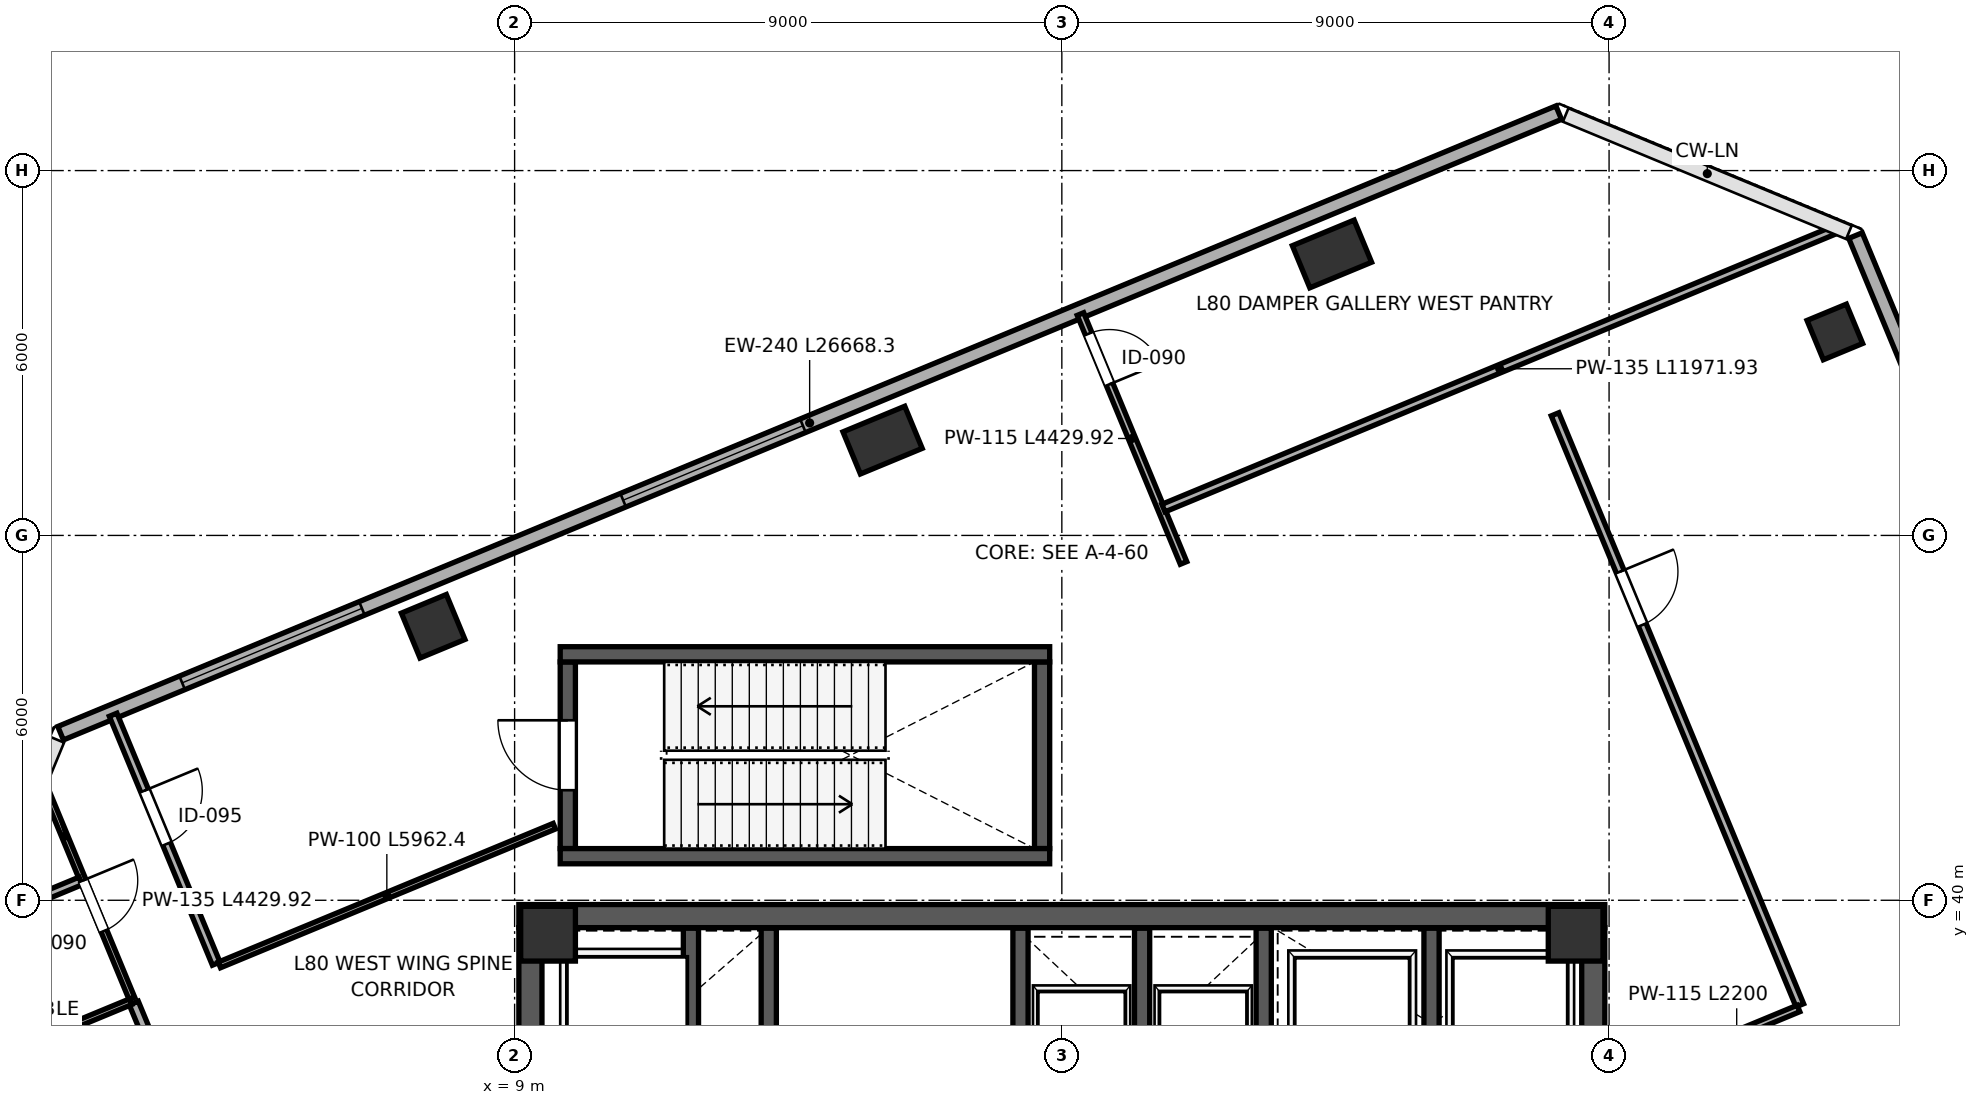
"""IFC4 building model, lengths in metres.
Left out: names, types, materials, properties, quantities, classifications, styles, units other than length and angle.
Written with IfcOpenShell. Run it as: python <this file> out.ifc"""

import sys

from ifc_helpers import new_model, si_unit, direction, frame, frame_2d, origin, origin_2d, place, context, subcontext, project, spatial, rectangle, extrude, source, transform, mapped, element, fill, save


model = new_model("IFC4")
c1 = context("Model", 3, precision=1e-05, world=origin(), true_north=direction((0.0, 1.0)))
c2 = subcontext(c1, "Body", "Model", "MODEL_VIEW")
j1 = project(units=[si_unit("LENGTHUNIT", "METRE"), si_unit("PLANEANGLEUNIT", "RADIAN")], contexts=[c1])
p1 = place(None, origin())
s1 = spatial("IfcSite", under=j1, at=p1, CompositionType="ELEMENT")
p2 = place(p1, origin())
s2 = spatial("IfcBuilding", under=s1, at=p2, CompositionType="ELEMENT")
p3 = place(p2, frame((0.0, 0.0, 355.2)))
s3 = spatial("IfcBuildingStorey", under=s2, at=p3, CompositionType="ELEMENT", Elevation=355.2)
m1 = source(origin(), c2, "Body", "SweptSolid", [
    extrude(rectangle(XDim=0.9, YDim=0.9, at=origin_2d()), origin(), (0.0, 0.0, 1.0), 4.799),
])
for number, where, z_axis, x_axis in (
    (1, (9.55, 39.45, 0.001), (0.0, 0.0, 1.0), (1.0, 0.0, 0.0)),
    (2, (26.45, 39.45, 0.001), (0.0, 0.0, 1.0), (1.0, 0.0, 0.0)),
):
    element("IfcColumn", number, at=place(p3, frame(where, z_axis=z_axis, x_axis=x_axis)), inside=s3, PredefinedType="COLUMN", context=c2, shape_type="MappedRepresentation", body=[
        mapped(m1, transform((0.0, 0.0, 0.0), scale=1.0)),
    ])
m2 = source(origin(), c2, "Body", "SweptSolid", [
    extrude(rectangle(XDim=0.7, YDim=0.7, at=origin_2d()), origin(), (0.0, 0.0, 1.0), 4.799),
])
p4 = place(p3, frame((30.713, 49.346, 0.001), z_axis=(0.0, 0.0, 1.0), x_axis=(-0.382683432365, 0.923879532511, 0.0)))
e3 = element("IfcColumn", 3, at=p4, inside=s3, PredefinedType="COLUMN", context=c2, shape_type="MappedRepresentation", body=[
    mapped(m2, transform((0.0, 0.0, 0.0), scale=1.0)),
])
m3 = source(origin(), c2, "Body", "SweptSolid", [
    extrude(rectangle(XDim=0.8, YDim=0.8, at=origin_2d()), origin(), (0.0, 0.0, 1.0), 4.799),
])
p5 = place(p3, frame((7.661, 44.506, 0.001), z_axis=(0.0, 0.0, 1.0), x_axis=(-0.382683432365, 0.923879532511, 0.0)))
e4 = element("IfcColumn", 4, at=p5, inside=s3, PredefinedType="COLUMN", context=c2, shape_type="MappedRepresentation", body=[
    mapped(m3, transform((0.0, 0.0, 0.0), scale=1.0)),
])
m4 = source(origin(), c2, "Body", "SweptSolid", [
    extrude(rectangle(XDim=0.75, YDim=1.1, at=origin_2d()), origin(), (0.0, 0.0, 1.0), 4.799),
])
for number, where, z_axis, x_axis in (
    (5, (15.052, 47.567, 0.001), (0.0, 0.0, 1.0), (-0.383, 0.924, 0.0)),
    (6, (22.443, 50.629, 0.001), (0.0, 0.0, 1.0), (-0.383, 0.924, 0.0)),
):
    element("IfcColumn", number, at=place(p3, frame(where, z_axis=z_axis, x_axis=x_axis)), inside=s3, PredefinedType="PILASTER", context=c2, shape_type="MappedRepresentation", body=[
        mapped(m4, transform((0.0, 0.0, 0.0), scale=1.0)),
    ])
p6 = place(p3, frame((40.761, 27.494, 0.0), z_axis=(0.0, 0.0, 1.0), x_axis=(-0.382690925775, 0.923876428604, 0.0)))
e7 = element("IfcWall", 7, at=p6, inside=s3, PredefinedType="SOLIDWALL", context=c2, shape_type="SweptSolid", body=[
    extrude(rectangle(XDim=25.368, YDim=0.24, at=frame_2d((12.684, 0.0))), origin(), (0.0, 0.0, 1.0), 4.52),
])
p7 = place(p6, frame((1.594, 0.0, 0.45)))
e8 = element("IfcOpeningElement", 8, at=p7, cuts=e7, PredefinedType="OPENING", context=c2, shape_type="SweptSolid", body=[
    extrude(rectangle(XDim=3.2, YDim=2.5, at=frame_2d((1.6, 1.25))), frame((0.0, 0.13, 0.0), z_axis=(0.0, -1.0, 0.0), x_axis=(1.0, 0.0, 0.0)), (0.0, 0.0, 1.0), 0.26),
])
p8 = place(p6, frame((5.144, 0.0, 0.45)))
e9 = element("IfcOpeningElement", 9, at=p8, cuts=e7, PredefinedType="OPENING", context=c2, shape_type="SweptSolid", body=[
    extrude(rectangle(XDim=3.2, YDim=2.5, at=frame_2d((1.6, 1.25))), frame((0.0, 0.13, 0.0), z_axis=(0.0, -1.0, 0.0), x_axis=(1.0, 0.0, 0.0)), (0.0, 0.0, 1.0), 0.26),
])
p9 = place(p6, frame((8.694, 0.0, 0.45)))
e10 = element("IfcOpeningElement", 10, at=p9, cuts=e7, PredefinedType="OPENING", context=c2, shape_type="SweptSolid", body=[
    extrude(rectangle(XDim=3.2, YDim=2.5, at=frame_2d((1.6, 1.25))), frame((0.0, 0.13, 0.0), z_axis=(0.0, -1.0, 0.0), x_axis=(1.0, 0.0, 0.0)), (0.0, 0.0, 1.0), 0.26),
])
p10 = place(p6, frame((12.244, 0.0, 0.45)))
e11 = element("IfcOpeningElement", 11, at=p10, cuts=e7, PredefinedType="OPENING", context=c2, shape_type="SweptSolid", body=[
    extrude(rectangle(XDim=3.2, YDim=2.5, at=frame_2d((1.6, 1.25))), frame((0.0, 0.13, 0.0), z_axis=(0.0, -1.0, 0.0), x_axis=(1.0, 0.0, 0.0)), (0.0, 0.0, 1.0), 0.26),
])
p11 = place(p6, frame((15.794, 0.0, 0.45)))
e12 = element("IfcOpeningElement", 12, at=p11, cuts=e7, PredefinedType="OPENING", context=c2, shape_type="SweptSolid", body=[
    extrude(rectangle(XDim=3.2, YDim=2.5, at=frame_2d((1.6, 1.25))), frame((0.0, 0.13, 0.0), z_axis=(0.0, -1.0, 0.0), x_axis=(1.0, 0.0, 0.0)), (0.0, 0.0, 1.0), 0.26),
])
p12 = place(p6, frame((19.344, 0.0, 0.45)))
e13 = element("IfcOpeningElement", 13, at=p12, cuts=e7, PredefinedType="OPENING", context=c2, shape_type="SweptSolid", body=[
    extrude(rectangle(XDim=3.2, YDim=2.5, at=frame_2d((1.6, 1.25))), frame((0.0, 0.13, 0.0), z_axis=(0.0, -1.0, 0.0), x_axis=(1.0, 0.0, 0.0)), (0.0, 0.0, 1.0), 0.26),
])
p13 = place(p3, frame((26.171, 52.953, 0.0), z_axis=(0.0, 0.0, 1.0), x_axis=(-0.923878251708, -0.382686524484, 0.0)))
e14 = element("IfcWall", 14, at=p13, inside=s3, PredefinedType="SOLIDWALL", context=c2, shape_type="SweptSolid", body=[
    extrude(rectangle(XDim=26.668, YDim=0.24, at=frame_2d((13.334, 0.0))), origin(), (0.0, 0.0, 1.0), 4.52),
])
p14 = place(p13, frame((13.454, 0.0, 0.45)))
e15 = element("IfcOpeningElement", 15, at=p14, cuts=e14, PredefinedType="OPENING", context=c2, shape_type="SweptSolid", body=[
    extrude(rectangle(XDim=3.2, YDim=2.5, at=frame_2d((1.6, 1.25))), frame((0.0, 0.13, 0.0), z_axis=(0.0, -1.0, 0.0), x_axis=(1.0, 0.0, 0.0)), (0.0, 0.0, 1.0), 0.26),
])
p15 = place(p13, frame((21.304, 0.0, 0.45)))
e16 = element("IfcOpeningElement", 16, at=p15, cuts=e14, PredefinedType="OPENING", context=c2, shape_type="SweptSolid", body=[
    extrude(rectangle(XDim=3.2, YDim=2.5, at=frame_2d((1.6, 1.25))), frame((0.0, 0.13, 0.0), z_axis=(0.0, -1.0, 0.0), x_axis=(1.0, 0.0, 0.0)), (0.0, 0.0, 1.0), 0.26),
])
p16 = place(p3, frame((9.26, 24.45, 0.0), z_axis=(0.0, 0.0, 1.0), x_axis=(0.0, 1.0, 0.0)))
e17 = element("IfcWall", 17, at=p16, inside=s3, PredefinedType="SHEAR", context=c2, shape_type="SweptSolid", body=[
    extrude(rectangle(XDim=15.1, YDim=0.38, at=frame_2d((7.55, 0.0))), origin(), (0.0, 0.0, 1.0), 4.52),
])
p17 = place(p16, frame((8.7, 0.0, 0.0)))
e18 = element("IfcOpeningElement", 18, at=p17, cuts=e17, PredefinedType="OPENING", context=c2, shape_type="SweptSolid", body=[
    extrude(rectangle(XDim=1.15, YDim=2.2, at=frame_2d((0.575, 1.1))), frame((0.0, 0.2, 0.0), z_axis=(0.0, -1.0, 0.0), x_axis=(1.0, 0.0, 0.0)), (0.0, 0.0, 1.0), 0.4),
])
p18 = place(p3, frame((26.74, 24.45, 0.0), z_axis=(0.0, 0.0, 1.0), x_axis=(0.0, 1.0, 0.0)))
e19 = element("IfcWall", 19, at=p18, inside=s3, PredefinedType="SHEAR", context=c2, shape_type="SweptSolid", body=[
    extrude(rectangle(XDim=15.1, YDim=0.38, at=frame_2d((7.55, 0.0))), origin(), (0.0, 0.0, 1.0), 4.52),
])
p19 = place(p18, frame((8.6, 0.0, 0.0)))
e20 = element("IfcOpeningElement", 20, at=p19, cuts=e19, PredefinedType="OPENING", context=c2, shape_type="SweptSolid", body=[
    extrude(rectangle(XDim=1.15, YDim=2.2, at=frame_2d((0.575, 1.1))), frame((0.0, 0.2, 0.0), z_axis=(0.0, -1.0, 0.0), x_axis=(1.0, 0.0, 0.0)), (0.0, 0.0, 1.0), 0.4),
])
p20 = place(p3, frame((9.07, 39.74, 0.0), z_axis=(0.0, 0.0, 1.0), x_axis=(1.0, 0.0, 0.0)))
e21 = element("IfcWall", 21, at=p20, inside=s3, PredefinedType="SHEAR", context=c2, shape_type="SweptSolid", body=[
    extrude(rectangle(XDim=17.86, YDim=0.38, at=frame_2d((8.93, 0.0))), origin(), (0.0, 0.0, 1.0), 4.52),
])
p21 = place(p3, frame((21.32, 32.12, 0.0), z_axis=(0.0, 0.0, 1.0), x_axis=(0.0, 1.0, 0.0)))
e22 = element("IfcWall", 22, at=p21, inside=s3, PredefinedType="SHEAR", context=c2, shape_type="SweptSolid", body=[
    extrude(rectangle(XDim=7.42, YDim=0.25, at=frame_2d((3.71, 0.0))), origin(), (0.0, 0.0, 1.0), 4.52),
])
p22 = place(p21, frame((1.4, 0.0, 0.0)))
e23 = element("IfcOpeningElement", 23, at=p22, cuts=e22, PredefinedType="OPENING", context=c2, shape_type="SweptSolid", body=[
    extrude(rectangle(XDim=1.15, YDim=2.2, at=frame_2d((0.575, 1.1))), frame((0.0, 0.135, 0.0), z_axis=(0.0, -1.0, 0.0), x_axis=(1.0, 0.0, 0.0)), (0.0, 0.0, 1.0), 0.27),
])
p23 = place(p3, frame((11.9, 36.31, 0.0), z_axis=(0.0, 0.0, 1.0), x_axis=(0.0, 1.0, 0.0)))
e24 = element("IfcWall", 24, at=p23, inside=s3, PredefinedType="SHEAR", context=c2, shape_type="SweptSolid", body=[
    extrude(rectangle(XDim=3.23, YDim=0.25, at=frame_2d((1.615, 0.0))), origin(), (0.0, 0.0, 1.0), 4.52),
])
p24 = place(p3, frame((24.08, 36.48, 0.0), z_axis=(0.0, 0.0, 1.0), x_axis=(0.0, 1.0, 0.0)))
e25 = element("IfcWall", 25, at=p24, inside=s3, PredefinedType="SHEAR", context=c2, shape_type="SweptSolid", body=[
    extrude(rectangle(XDim=3.06, YDim=0.25, at=frame_2d((1.53, 0.0))), origin(), (0.0, 0.0, 1.0), 4.52),
])
p25 = place(p3, frame((13.18, 36.2, 0.0), z_axis=(0.0, 0.0, 1.0), x_axis=(0.0, 1.0, 0.0)))
e26 = element("IfcWall", 26, at=p25, inside=s3, PredefinedType="SHEAR", context=c2, shape_type="SweptSolid", body=[
    extrude(rectangle(XDim=3.34, YDim=0.25, at=frame_2d((1.67, 0.0))), origin(), (0.0, 0.0, 1.0), 4.52),
])
for number, where, z_axis, x_axis in (
    (27, (17.32, 35.81, 0.0), (0.0, 0.0, 1.0), (0.0, 1.0, 0.0)),
    (28, (19.32, 35.81, 0.0), (0.0, 0.0, 1.0), (0.0, 1.0, 0.0)),
):
    element("IfcWall", number, at=place(p3, frame(where, z_axis=z_axis, x_axis=x_axis)), inside=s3, PredefinedType="SHEAR", context=c2, shape_type="SweptSolid", body=[
        extrude(rectangle(XDim=3.73, YDim=0.25, at=frame_2d((1.865, 0.0))), origin(), (0.0, 0.0, 1.0), 4.52),
    ])
p26 = place(p3, frame((9.875, 40.85, 0.0), z_axis=(0.0, 0.0, 1.0), x_axis=(0.0, 1.0, 0.0)))
e29 = element("IfcWall", 29, at=p26, inside=s3, PredefinedType="SHEAR", context=c2, shape_type="SweptSolid", body=[
    extrude(rectangle(XDim=3.07, YDim=0.25, at=frame_2d((1.535, 0.0))), origin(), (0.0, 0.0, 1.0), 4.52),
])
p27 = place(p26, frame((0.96, 0.0, 0.0)))
e30 = element("IfcOpeningElement", 30, at=p27, cuts=e29, PredefinedType="OPENING", context=c2, shape_type="SweptSolid", body=[
    extrude(rectangle(XDim=1.15, YDim=2.2, at=frame_2d((0.575, 1.1))), frame((0.0, 0.135, 0.0), z_axis=(0.0, -1.0, 0.0), x_axis=(1.0, 0.0, 0.0)), (0.0, 0.0, 1.0), 0.27),
])
p28 = place(p3, frame((17.675, 40.85, 0.0), z_axis=(0.0, 0.0, 1.0), x_axis=(0.0, 1.0, 0.0)))
e31 = element("IfcWall", 31, at=p28, inside=s3, PredefinedType="SHEAR", context=c2, shape_type="SweptSolid", body=[
    extrude(rectangle(XDim=3.07, YDim=0.25, at=frame_2d((1.535, 0.0))), origin(), (0.0, 0.0, 1.0), 4.52),
])
for number, where, z_axis, x_axis in (
    (32, (9.75, 40.725, 0.0), (0.0, 0.0, 1.0), (1.0, 0.0, 0.0)),
    (33, (9.75, 44.045, 0.0), (0.0, 0.0, 1.0), (1.0, 0.0, 0.0)),
):
    element("IfcWall", number, at=place(p3, frame(where, z_axis=z_axis, x_axis=x_axis)), inside=s3, PredefinedType="SHEAR", context=c2, shape_type="SweptSolid", body=[
        extrude(rectangle(XDim=8.05, YDim=0.25, at=frame_2d((4.025, 0.0))), origin(), (0.0, 0.0, 1.0), 4.52),
    ])
p29 = place(p3, frame((1.232, 41.943, 0.0), z_axis=(0.0, 0.0, 1.0), x_axis=(0.382652221475, -0.923892459868, 0.0)))
e34 = element("IfcWall", 34, at=p29, inside=s3, PredefinedType="PARTITIONING", context=c2, shape_type="SweptSolid", body=[
    extrude(rectangle(XDim=3.852, YDim=0.1, at=frame_2d((1.926, 0.0))), origin(), (0.0, 0.0, 1.0), 4.52),
])
p30 = place(p29, frame((1.75, 0.0, 0.0)))
e35 = element("IfcOpeningElement", 35, at=p30, cuts=e34, PredefinedType="OPENING", context=c2, shape_type="SweptSolid", body=[
    extrude(rectangle(XDim=0.9, YDim=2.15, at=frame_2d((0.45, 1.075))), frame((0.0, 0.06, 0.0), z_axis=(0.0, -1.0, 0.0), x_axis=(1.0, 0.0, 0.0)), (0.0, 0.0, 1.0), 0.12),
])
p31 = place(p3, frame((0.29, 39.667, 0.0), z_axis=(0.0, 0.0, 1.0), x_axis=(0.923855963606, 0.38274032778, 0.0)))
e36 = element("IfcWall", 36, at=p31, inside=s3, PredefinedType="PARTITIONING", context=c2, shape_type="SweptSolid", body=[
    extrude(rectangle(XDim=1.702, YDim=0.135, at=frame_2d((0.851, 0.0))), origin(), (0.0, 0.0, 1.0), 4.52),
])
p32 = place(p3, frame((2.737, 38.31, 0.0), z_axis=(0.0, 0.0, 1.0), x_axis=(0.382706260748, -0.923870076355, 0.0)))
e37 = element("IfcWall", 37, at=p32, inside=s3, PredefinedType="PARTITIONING", context=c2, shape_type="SweptSolid", body=[
    extrude(rectangle(XDim=3.67, YDim=0.16, at=frame_2d((1.835, 0.0))), origin(), (0.0, 0.0, 1.0), 4.52),
])
p33 = place(p32, frame((0.85, 0.0, 0.0)))
e38 = element("IfcOpeningElement", 38, at=p33, cuts=e37, PredefinedType="OPENING", context=c2, shape_type="SweptSolid", body=[
    extrude(rectangle(XDim=0.95, YDim=2.15, at=frame_2d((0.475, 1.075))), frame((0.0, 0.09, 0.0), z_axis=(0.0, -1.0, 0.0), x_axis=(1.0, 0.0, 0.0)), (0.0, 0.0, 1.0), 0.18),
])
p34 = place(p3, frame((-0.142, 37.161, 0.0), z_axis=(0.0, 0.0, 1.0), x_axis=(0.923868053335, 0.382711144374, 0.0)))
e39 = element("IfcWall", 39, at=p34, inside=s3, PredefinedType="PARTITIONING", context=c2, shape_type="SweptSolid", body=[
    extrude(rectangle(XDim=3.06, YDim=0.1, at=frame_2d((1.53, 0.0))), origin(), (0.0, 0.0, 1.0), 4.52),
])
p35 = place(p3, frame((26.111, 47.992, 0.0), z_axis=(0.0, 0.0, 1.0), x_axis=(0.382686563741, -0.923878235447, 0.0)))
e40 = element("IfcWall", 40, at=p35, inside=s3, PredefinedType="PARTITIONING", context=c2, shape_type="SweptSolid", body=[
    extrude(rectangle(XDim=10.52, YDim=0.135, at=frame_2d((5.26, 0.0))), origin(), (0.0, 0.0, 1.0), 4.52),
])
p36 = place(p35, frame((2.8, 0.0, 0.0)))
e41 = element("IfcOpeningElement", 41, at=p36, cuts=e40, PredefinedType="OPENING", context=c2, shape_type="SweptSolid", body=[
    extrude(rectangle(XDim=0.95, YDim=2.15, at=frame_2d((0.475, 1.075))), frame((0.0, 0.078, 0.0), z_axis=(0.0, -1.0, 0.0), x_axis=(1.0, 0.0, 0.0)), (0.0, 0.0, 1.0), 0.155),
])
p37 = place(p3, frame((28.083, 37.378, 0.0), z_axis=(0.0, 0.0, 1.0), x_axis=(0.923853160736, 0.382747093259, 0.0)))
e42 = element("IfcWall", 42, at=p37, inside=s3, PredefinedType="PARTITIONING", context=c2, shape_type="SweptSolid", body=[
    extrude(rectangle(XDim=2.2, YDim=0.115, at=frame_2d((1.1, 0.0))), origin(), (0.0, 0.0, 1.0), 4.52),
])
p38 = place(p3, frame((2.397, 43.051, 0.0), z_axis=(0.0, 0.0, 1.0), x_axis=(0.382689257808, -0.923877119512, 0.0)))
e43 = element("IfcWall", 43, at=p38, inside=s3, PredefinedType="PARTITIONING", context=c2, shape_type="SweptSolid", body=[
    extrude(rectangle(XDim=4.43, YDim=0.135, at=frame_2d((2.215, 0.0))), origin(), (0.0, 0.0, 1.0), 4.52),
])
p39 = place(p38, frame((1.35, 0.0, 0.0)))
e44 = element("IfcOpeningElement", 44, at=p39, cuts=e43, PredefinedType="OPENING", context=c2, shape_type="SweptSolid", body=[
    extrude(rectangle(XDim=0.95, YDim=2.15, at=frame_2d((0.475, 1.075))), frame((0.0, 0.078, 0.0), z_axis=(0.0, -1.0, 0.0), x_axis=(1.0, 0.0, 0.0)), (0.0, 0.0, 1.0), 0.155),
])
p40 = place(p3, frame((18.306, 49.64, 0.0), z_axis=(0.0, 0.0, 1.0), x_axis=(0.382708743564, -0.923869047863, 0.0)))
e45 = element("IfcWall", 45, at=p40, inside=s3, PredefinedType="PARTITIONING", context=c2, shape_type="SweptSolid", body=[
    extrude(rectangle(XDim=4.43, YDim=0.115, at=frame_2d((2.215, 0.0))), origin(), (0.0, 0.0, 1.0), 3.855),
])
p41 = place(p40, frame((0.35, 0.0, 0.0)))
e46 = element("IfcOpeningElement", 46, at=p41, cuts=e45, PredefinedType="OPENING", context=c2, shape_type="SweptSolid", body=[
    extrude(rectangle(XDim=0.9, YDim=2.15, at=frame_2d((0.45, 1.075))), frame((0.0, 0.067, 0.0), z_axis=(0.0, -1.0, 0.0), x_axis=(1.0, 0.0, 0.0)), (0.0, 0.0, 1.0), 0.135),
])
p42 = place(p3, frame((4.145, 38.936, 0.0), z_axis=(0.0, 0.0, 1.0), x_axis=(0.923878093623, 0.38268690613, 0.0)))
e47 = element("IfcWall", 47, at=p42, inside=s3, PredefinedType="PARTITIONING", context=c2, shape_type="SweptSolid", body=[
    extrude(rectangle(XDim=5.962, YDim=0.1, at=frame_2d((2.981, 0.0))), origin(), (0.0, 0.0, 1.0), 4.52),
])
p43 = place(p3, frame((19.671, 46.45, 0.0), z_axis=(0.0, 0.0, 1.0), x_axis=(0.923879139167, 0.38268438198, 0.0)))
e48 = element("IfcWall", 48, at=p43, inside=s3, PredefinedType="PARTITIONING", context=c2, shape_type="SweptSolid", body=[
    extrude(rectangle(XDim=11.972, YDim=0.135, at=frame_2d((5.986, 0.0))), origin(), (0.0, 0.0, 1.0), 4.52),
])
m5 = source(origin(), c2, "Body", "SweptSolid", [
    extrude(rectangle(XDim=3.2, YDim=2.5, at=frame_2d((1.6, 1.25))), frame((0.0, 0.03, 0.0), z_axis=(0.0, -1.0, 0.0), x_axis=(1.0, 0.0, 0.0)), (0.0, 0.0, 1.0), 0.06),
])
p44 = place(p14, origin())
e49 = element("IfcWindow", 49, at=p44, inside=s3, PartitioningType="TRIPLE_PANEL_VERTICAL", PredefinedType="WINDOW", context=c2, shape_type="MappedRepresentation", body=[
    mapped(m5, transform((0.0, 0.0, 0.0), scale=1.0)),
])
fill(e15, e49)
p45 = place(p15, origin())
e50 = element("IfcWindow", 50, at=p45, inside=s3, PartitioningType="TRIPLE_PANEL_VERTICAL", PredefinedType="WINDOW", context=c2, shape_type="MappedRepresentation", body=[
    mapped(m5, transform((0.0, 0.0, 0.0), scale=1.0)),
])
fill(e16, e50)
m6 = source(origin(), c2, "Body", "SweptSolid", [
    extrude(rectangle(XDim=1.15, YDim=2.2, at=frame_2d((0.575, 1.1))), frame((0.0, 0.025, 0.0), z_axis=(0.0, -1.0, 0.0), x_axis=(1.0, 0.0, 0.0)), (0.0, 0.0, 1.0), 0.05),
])
p46 = place(p27, origin())
e51 = element("IfcDoor", 51, at=p46, inside=s3, OperationType="SINGLE_SWING_RIGHT", PredefinedType="DOOR", context=c2, shape_type="MappedRepresentation", body=[
    mapped(m6, transform((0.0, 0.0, 0.0), scale=1.0)),
])
fill(e30, e51)
m7 = source(origin(), c2, "Body", "SweptSolid", [
    extrude(rectangle(XDim=0.9, YDim=2.15, at=frame_2d((0.45, 1.075))), frame((0.0, 0.025, 0.0), z_axis=(0.0, -1.0, 0.0), x_axis=(1.0, 0.0, 0.0)), (0.0, 0.0, 1.0), 0.05),
])
p47 = place(p30, origin())
e52 = element("IfcDoor", 52, at=p47, inside=s3, OperationType="SINGLE_SWING_LEFT", PredefinedType="DOOR", context=c2, shape_type="MappedRepresentation", body=[
    mapped(m7, transform((0.0, 0.0, 0.0), scale=1.0)),
])
fill(e35, e52)
m8 = source(origin(), c2, "Body", "SweptSolid", [
    extrude(rectangle(XDim=0.95, YDim=2.15, at=frame_2d((0.475, 1.075))), frame((0.0, 0.025, 0.0), z_axis=(0.0, -1.0, 0.0), x_axis=(1.0, 0.0, 0.0)), (0.0, 0.0, 1.0), 0.05),
])
p48 = place(p36, origin())
e53 = element("IfcDoor", 53, at=p48, inside=s3, OperationType="SINGLE_SWING_LEFT", PredefinedType="DOOR", context=c2, shape_type="MappedRepresentation", body=[
    mapped(m8, transform((0.0, 0.0, 0.0), scale=1.0)),
])
fill(e41, e53)
p49 = place(p39, origin())
e54 = element("IfcDoor", 54, at=p49, inside=s3, OperationType="SINGLE_SWING_LEFT", PredefinedType="DOOR", context=c2, shape_type="MappedRepresentation", body=[
    mapped(m8, transform((0.0, 0.0, 0.0), scale=1.0)),
])
fill(e44, e54)
p50 = place(p41, origin())
e55 = element("IfcDoor", 55, at=p50, inside=s3, OperationType="SINGLE_SWING_RIGHT", PredefinedType="DOOR", context=c2, shape_type="MappedRepresentation", body=[
    mapped(m7, transform((0.0, 0.0, 0.0), scale=1.0)),
])
fill(e46, e55)
save(model, sys.argv[1])
